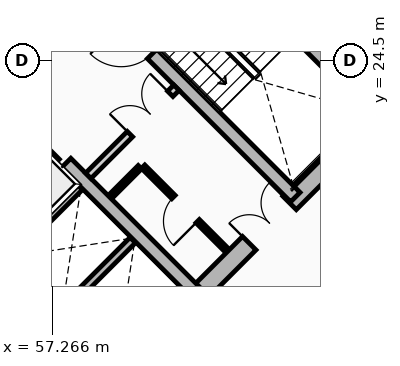
"""IFC4 building model, lengths in metres.
Left out: names, types, materials, properties, quantities, classifications, styles, units other than length and angle.
Written with IfcOpenShell. Run it as: python <this file> out.ifc"""

import sys

from ifc_helpers import new_model, si_unit, direction, frame, frame_2d, origin, place, context, subcontext, project, spatial, rectangle, extrude, source, transform, mapped, element, fill, save


model = new_model("IFC4")
c1 = context("Model", 3, precision=1e-05, world=origin(), true_north=direction((0.0, 1.0)))
c2 = subcontext(c1, "Body", "Model", "MODEL_VIEW")
j1 = project(units=[si_unit("LENGTHUNIT", "METRE"), si_unit("PLANEANGLEUNIT", "RADIAN")], contexts=[c1])
p1 = place(None, origin())
s1 = spatial("IfcSite", under=j1, at=p1, CompositionType="ELEMENT")
p2 = place(p1, origin())
s2 = spatial("IfcBuilding", under=s1, at=p2, CompositionType="ELEMENT")
p3 = place(p2, frame((0.0, 0.0, 48.19)))
s3 = spatial("IfcBuildingStorey", under=s2, at=p3, CompositionType="ELEMENT", Elevation=48.19)
for number, where, z_axis, x_axis in (
    (1, (58.773, 15.661, 0.0), (0.0, 0.0, 1.0), (-0.707, 0.707, 0.0)),
    (2, (66.339, 23.227, 0.0), (0.0, 0.0, 1.0), (-0.707, 0.707, 0.0)),
):
    element("IfcWall", number, at=place(p3, frame(where, z_axis=z_axis, x_axis=x_axis)), inside=s3, PredefinedType="SHEAR", context=c2, shape_type="SweptSolid", body=[
        extrude(rectangle(XDim=14.3, YDim=0.5, at=frame_2d((7.15, 0.0))), origin(), (0.0, 0.0, 1.0), 2.91),
    ])
p4 = place(p3, frame((58.596, 15.838, 0.0), z_axis=(0.0, 0.0, 1.0), x_axis=(0.707106781187, 0.707106781187, 0.0)))
e3 = element("IfcWall", 3, at=p4, inside=s3, PredefinedType="SHEAR", context=c2, shape_type="SweptSolid", body=[
    extrude(rectangle(XDim=10.7, YDim=0.5, at=frame_2d((5.35, 0.0))), origin(), (0.0, 0.0, 1.0), 2.91),
])
m1 = source(origin(), c2, "Body", "SweptSolid", [
    extrude(rectangle(XDim=1.5, YDim=2.02, at=frame_2d((0.75, 1.01))), frame((0.0, 0.26, 0.0), z_axis=(0.0, -1.0, 0.0), x_axis=(1.0, 0.0, 0.0)), (0.0, 0.0, 1.0), 0.52),
])
p5 = place(p4, frame((5.45, 0.0, 0.0)))
e4 = element("IfcOpeningElement", 4, at=p5, cuts=e3, PredefinedType="OPENING", context=c2, shape_type="MappedRepresentation", body=[
    mapped(m1, transform((0.0, 0.0, 0.0), x_axis=(1.0, 0.0, 0.0), y_axis=(0.0, 1.0, 0.0), z_axis=(0.0, 0.0, 1.0), scale=1.0)),
])
p6 = place(p3, frame((61.096, 18.338, 0.0), z_axis=(0.0, 0.0, 1.0), x_axis=(-0.707106781187, 0.707106781187, 0.0)))
e5 = element("IfcWall", 5, at=p6, inside=s3, PredefinedType="SHEAR", context=c2, shape_type="SweptSolid", body=[
    extrude(rectangle(XDim=13.8, YDim=0.35, at=frame_2d((6.9, 0.0))), origin(), (0.0, 0.0, 1.0), 2.91),
])
m2 = source(origin(), c2, "Body", "SweptSolid", [
    extrude(rectangle(XDim=1.1, YDim=2.015, at=frame_2d((0.55, 1.007))), frame((0.0, 0.185, 0.0), z_axis=(0.0, -1.0, 0.0), x_axis=(1.0, 0.0, 0.0)), (0.0, 0.0, 1.0), 0.37),
])
p7 = place(p6, frame((4.9, 0.0, 0.0)))
e6 = element("IfcOpeningElement", 6, at=p7, cuts=e5, PredefinedType="OPENING", context=c2, shape_type="MappedRepresentation", body=[
    mapped(m2, transform((0.0, 0.0, 0.0), x_axis=(1.0, 0.0, 0.0), y_axis=(0.0, 1.0, 0.0), z_axis=(0.0, 0.0, 1.0), scale=1.0)),
])
m3 = source(origin(), c2, "Body", "SweptSolid", [
    extrude(rectangle(XDim=1.15, YDim=2.02, at=frame_2d((0.575, 1.01))), frame((0.0, 0.185, 0.0), z_axis=(0.0, -1.0, 0.0), x_axis=(1.0, 0.0, 0.0)), (0.0, 0.0, 1.0), 0.37),
])
p8 = place(p6, frame((7.32, 0.0, 0.0)))
e7 = element("IfcOpeningElement", 7, at=p8, cuts=e5, PredefinedType="OPENING", context=c2, shape_type="MappedRepresentation", body=[
    mapped(m3, transform((0.0, 0.0, 0.0), x_axis=(1.0, 0.0, 0.0), y_axis=(0.0, 1.0, 0.0), z_axis=(0.0, 0.0, 1.0), scale=1.0)),
])
p9 = place(p3, frame((63.662, 20.904, 0.0), z_axis=(0.0, 0.0, 1.0), x_axis=(-0.707106781187, 0.707106781187, 0.0)))
e8 = element("IfcWall", 8, at=p9, inside=s3, PredefinedType="SHEAR", context=c2, shape_type="SweptSolid", body=[
    extrude(rectangle(XDim=13.8, YDim=0.35, at=frame_2d((6.9, 0.0))), origin(), (0.0, 0.0, 1.0), 2.91),
])
p10 = place(p9, frame((10.025, 0.0, 0.0)))
e9 = element("IfcOpeningElement", 9, at=p10, cuts=e8, PredefinedType="OPENING", context=c2, shape_type="MappedRepresentation", body=[
    mapped(m2, transform((0.0, 0.0, 0.0), x_axis=(1.0, 0.0, 0.0), y_axis=(0.0, 1.0, 0.0), z_axis=(0.0, 0.0, 1.0), scale=1.0)),
])
p11 = place(p9, frame((12.025, 0.0, 0.0)))
e10 = element("IfcOpeningElement", 10, at=p11, cuts=e8, PredefinedType="OPENING", context=c2, shape_type="MappedRepresentation", body=[
    mapped(m2, transform((0.0, 0.0, 0.0), x_axis=(1.0, 0.0, 0.0), y_axis=(0.0, 1.0, 0.0), z_axis=(0.0, 0.0, 1.0), scale=1.0)),
])
p12 = place(p9, frame((5.33, 0.0, 0.0)))
e11 = element("IfcOpeningElement", 11, at=p12, cuts=e8, PredefinedType="OPENING", context=c2, shape_type="MappedRepresentation", body=[
    mapped(m3, transform((0.0, 0.0, 0.0), x_axis=(1.0, 0.0, 0.0), y_axis=(0.0, 1.0, 0.0), z_axis=(0.0, 0.0, 1.0), scale=1.0)),
])
p13 = place(p3, frame((65.847, 23.089, 0.0), z_axis=(0.0, 0.0, 1.0), x_axis=(-0.707106781187, 0.707106781187, 0.0)))
e12 = element("IfcWall", 12, at=p13, inside=s3, PredefinedType="SHEAR", context=c2, shape_type="SweptSolid", body=[
    extrude(rectangle(XDim=6.745, YDim=0.35, at=frame_2d((3.373, 0.0))), origin(), (0.0, 0.0, 1.0), 2.91),
])
p14 = place(p3, frame((55.888, 19.069, 0.0), z_axis=(0.0, 0.0, 1.0), x_axis=(0.707106781187, 0.707106781187, 0.0)))
e13 = element("IfcWall", 13, at=p14, inside=s3, PredefinedType="SHEAR", context=c2, shape_type="SweptSolid", body=[
    extrude(rectangle(XDim=2.97, YDim=0.2, at=frame_2d((1.485, 0.0))), origin(), (0.0, 0.0, 1.0), 2.91),
])
p15 = place(p3, frame((57.284, 17.673, 0.0), z_axis=(0.0, 0.0, 1.0), x_axis=(0.707147878904, 0.70706568108, 0.0)))
e14 = element("IfcWall", 14, at=p15, inside=s3, PredefinedType="SHEAR", context=c2, shape_type="SweptSolid", body=[
    extrude(rectangle(XDim=2.97, YDim=0.2, at=frame_2d((1.485, 0.0))), origin(), (0.0, 0.0, 1.0), 2.91),
])
p16 = place(p3, frame((57.412, 17.97, 0.0), z_axis=(0.0, 0.0, 1.0), x_axis=(-0.707106781187, 0.707106781187, 0.0)))
e15 = element("IfcWall", 15, at=p16, inside=s3, PredefinedType="SHEAR", context=c2, shape_type="SweptSolid", body=[
    extrude(rectangle(XDim=1.735, YDim=0.2, at=frame_2d((0.867, 0.0))), origin(), (0.0, 0.0, 1.0), 2.91),
])
p17 = place(p3, frame((58.214, 21.467, 0.0), z_axis=(0.0, 0.0, 1.0), x_axis=(0.707106781187, 0.707106781187, 0.0)))
e16 = element("IfcWall", 16, at=p17, inside=s3, PredefinedType="PARTITIONING", context=c2, shape_type="SweptSolid", body=[
    extrude(rectangle(XDim=3.28, YDim=0.2, at=frame_2d((1.64, 0.0))), origin(), (0.0, 0.0, 1.0), 2.635),
])
m4 = source(origin(), c2, "Body", "SweptSolid", [
    extrude(rectangle(XDim=1.5, YDim=2.02, at=frame_2d((0.75, 1.01))), frame((0.0, 0.11, 0.0), z_axis=(0.0, -1.0, 0.0), x_axis=(1.0, 0.0, 0.0)), (0.0, 0.0, 1.0), 0.22),
])
p18 = place(p17, frame((1.55, 0.0, 0.0)))
e17 = element("IfcOpeningElement", 17, at=p18, cuts=e16, PredefinedType="OPENING", context=c2, shape_type="MappedRepresentation", body=[
    mapped(m4, transform((0.0, 0.0, 0.0), x_axis=(1.0, 0.0, 0.0), y_axis=(0.0, 1.0, 0.0), z_axis=(0.0, 0.0, 1.0), scale=1.0)),
])
p19 = place(p3, frame((54.961, 24.719, 0.0), z_axis=(0.0, 0.0, 1.0), x_axis=(0.707106781187, 0.707106781187, 0.0)))
e18 = element("IfcWall", 18, at=p19, inside=s3, PredefinedType="PARTITIONING", context=c2, shape_type="SweptSolid", body=[
    extrude(rectangle(XDim=3.28, YDim=0.2, at=frame_2d((1.64, 0.0))), origin(), (0.0, 0.0, 1.0), 2.635),
])
m5 = source(origin(), c2, "Body", "SweptSolid", [
    extrude(rectangle(XDim=0.9, YDim=2.005, at=frame_2d((0.45, 1.002))), frame((0.0, 0.11, 0.0), z_axis=(0.0, -1.0, 0.0), x_axis=(1.0, 0.0, 0.0)), (0.0, 0.0, 1.0), 0.22),
])
p20 = place(p19, frame((0.16, 0.0, 0.0)))
e19 = element("IfcOpeningElement", 19, at=p20, cuts=e18, PredefinedType="OPENING", context=c2, shape_type="MappedRepresentation", body=[
    mapped(m5, transform((0.0, 0.0, 0.0), x_axis=(1.0, 0.0, 0.0), y_axis=(0.0, 1.0, 0.0), z_axis=(0.0, 0.0, 1.0), scale=1.0)),
])
p21 = place(p3, frame((61.835, 19.529, 0.0), z_axis=(0.0, 0.0, 1.0), x_axis=(-0.707146413884, 0.707067146267, 0.0)))
e20 = element("IfcWall", 20, at=p21, inside=s3, PredefinedType="PARTITIONING", context=c2, shape_type="SweptSolid", body=[
    extrude(rectangle(XDim=3.08, YDim=0.125, at=frame_2d((1.54, 0.0))), origin(), (0.0, 0.0, 1.0), 2.635),
])
m6 = source(origin(), c2, "Body", "SweptSolid", [
    extrude(rectangle(XDim=0.9, YDim=2.005, at=frame_2d((0.45, 1.002))), frame((0.0, 0.073, 0.0), z_axis=(0.0, -1.0, 0.0), x_axis=(1.0, 0.0, 0.0)), (0.0, 0.0, 1.0), 0.145),
])
p22 = place(p21, frame((1.05, 0.0, 0.0)))
e21 = element("IfcOpeningElement", 21, at=p22, cuts=e20, PredefinedType="OPENING", context=c2, shape_type="MappedRepresentation", body=[
    mapped(m6, transform((0.0, 0.0, 0.0), x_axis=(1.0, 0.0, 0.0), y_axis=(0.0, 1.0, 0.0), z_axis=(0.0, 0.0, 1.0), scale=1.0)),
])
p23 = place(p3, frame((58.794, 20.915, 0.0), z_axis=(0.0, 0.0, 1.0), x_axis=(0.707106781187, 0.707106781187, 0.0)))
e22 = element("IfcWall", 22, at=p23, inside=s3, PredefinedType="PARTITIONING", context=c2, shape_type="SweptSolid", body=[
    extrude(rectangle(XDim=1.1, YDim=0.125, at=frame_2d((0.55, 0.0))), origin(), (0.0, 0.0, 1.0), 2.635),
])
p24 = place(p3, frame((62.867, 16.702, 0.0), z_axis=(0.0, 0.0, 1.0), x_axis=(0.682449206191, 0.73093302085, 0.0)))
e23 = element("IfcWall", 23, at=p24, inside=s3, PredefinedType="PARTITIONING", context=c2, shape_type="SweptSolid", body=[
    extrude(rectangle(XDim=6.642, YDim=0.15, at=frame_2d((3.321, 0.0))), origin(), (0.0, 0.0, 1.0), 2.159),
])
m7 = source(origin(), c2, "Body", "SweptSolid", [
    extrude(rectangle(XDim=1.1, YDim=2.015, at=frame_2d((0.55, 1.007))), frame((0.0, 0.025, 0.0), z_axis=(0.0, -1.0, 0.0), x_axis=(1.0, 0.0, 0.0)), (0.0, 0.0, 1.0), 0.05),
])
p25 = place(p7, origin())
e24 = element("IfcDoor", 24, at=p25, inside=s3, OperationType="SLIDING_TO_RIGHT", PredefinedType="DOOR", context=c2, shape_type="MappedRepresentation", body=[
    mapped(m7, transform((0.0, 0.0, 0.0), x_axis=(1.0, 0.0, 0.0), y_axis=(0.0, 1.0, 0.0), z_axis=(0.0, 0.0, 1.0), scale=1.0)),
])
fill(e6, e24)
m8 = source(origin(), c2, "Body", "SweptSolid", [
    extrude(rectangle(XDim=1.15, YDim=2.02, at=frame_2d((0.575, 1.01))), frame((0.0, 0.025, 0.0), z_axis=(0.0, -1.0, 0.0), x_axis=(1.0, 0.0, 0.0)), (0.0, 0.0, 1.0), 0.05),
])
p26 = place(p12, origin())
e25 = element("IfcDoor", 25, at=p26, inside=s3, OperationType="SINGLE_SWING_RIGHT", PredefinedType="DOOR", context=c2, shape_type="MappedRepresentation", body=[
    mapped(m8, transform((0.0, 0.0, 0.0), x_axis=(1.0, 0.0, 0.0), y_axis=(0.0, 1.0, 0.0), z_axis=(0.0, 0.0, 1.0), scale=1.0)),
])
fill(e11, e25)
m9 = source(origin(), c2, "Body", "SweptSolid", [
    extrude(rectangle(XDim=1.5, YDim=2.02, at=frame_2d((0.75, 1.01))), frame((0.0, 0.025, 0.0), z_axis=(0.0, -1.0, 0.0), x_axis=(1.0, 0.0, 0.0)), (0.0, 0.0, 1.0), 0.05),
])
p27 = place(p5, origin())
e26 = element("IfcDoor", 26, at=p27, inside=s3, OperationType="DOUBLE_DOOR_SINGLE_SWING", PredefinedType="DOOR", context=c2, shape_type="MappedRepresentation", body=[
    mapped(m9, transform((0.0, 0.0, 0.0), x_axis=(1.0, 0.0, 0.0), y_axis=(0.0, 1.0, 0.0), z_axis=(0.0, 0.0, 1.0), scale=1.0)),
])
fill(e4, e26)
p28 = place(p18, origin())
e27 = element("IfcDoor", 27, at=p28, inside=s3, OperationType="DOUBLE_DOOR_SINGLE_SWING", PredefinedType="DOOR", context=c2, shape_type="MappedRepresentation", body=[
    mapped(m9, transform((0.0, 0.0, 0.0), x_axis=(1.0, 0.0, 0.0), y_axis=(0.0, 1.0, 0.0), z_axis=(0.0, 0.0, 1.0), scale=1.0)),
])
fill(e17, e27)
m10 = source(origin(), c2, "Body", "SweptSolid", [
    extrude(rectangle(XDim=0.9, YDim=2.005, at=frame_2d((0.45, 1.002))), frame((0.0, 0.025, 0.0), z_axis=(0.0, -1.0, 0.0), x_axis=(1.0, 0.0, 0.0)), (0.0, 0.0, 1.0), 0.05),
])
p29 = place(p22, origin())
e28 = element("IfcDoor", 28, at=p29, inside=s3, OperationType="SINGLE_SWING_LEFT", PredefinedType="DOOR", context=c2, shape_type="MappedRepresentation", body=[
    mapped(m10, transform((0.0, 0.0, 0.0), x_axis=(1.0, 0.0, 0.0), y_axis=(0.0, 1.0, 0.0), z_axis=(0.0, 0.0, 1.0), scale=1.0)),
])
fill(e21, e28)
save(model, sys.argv[1])
